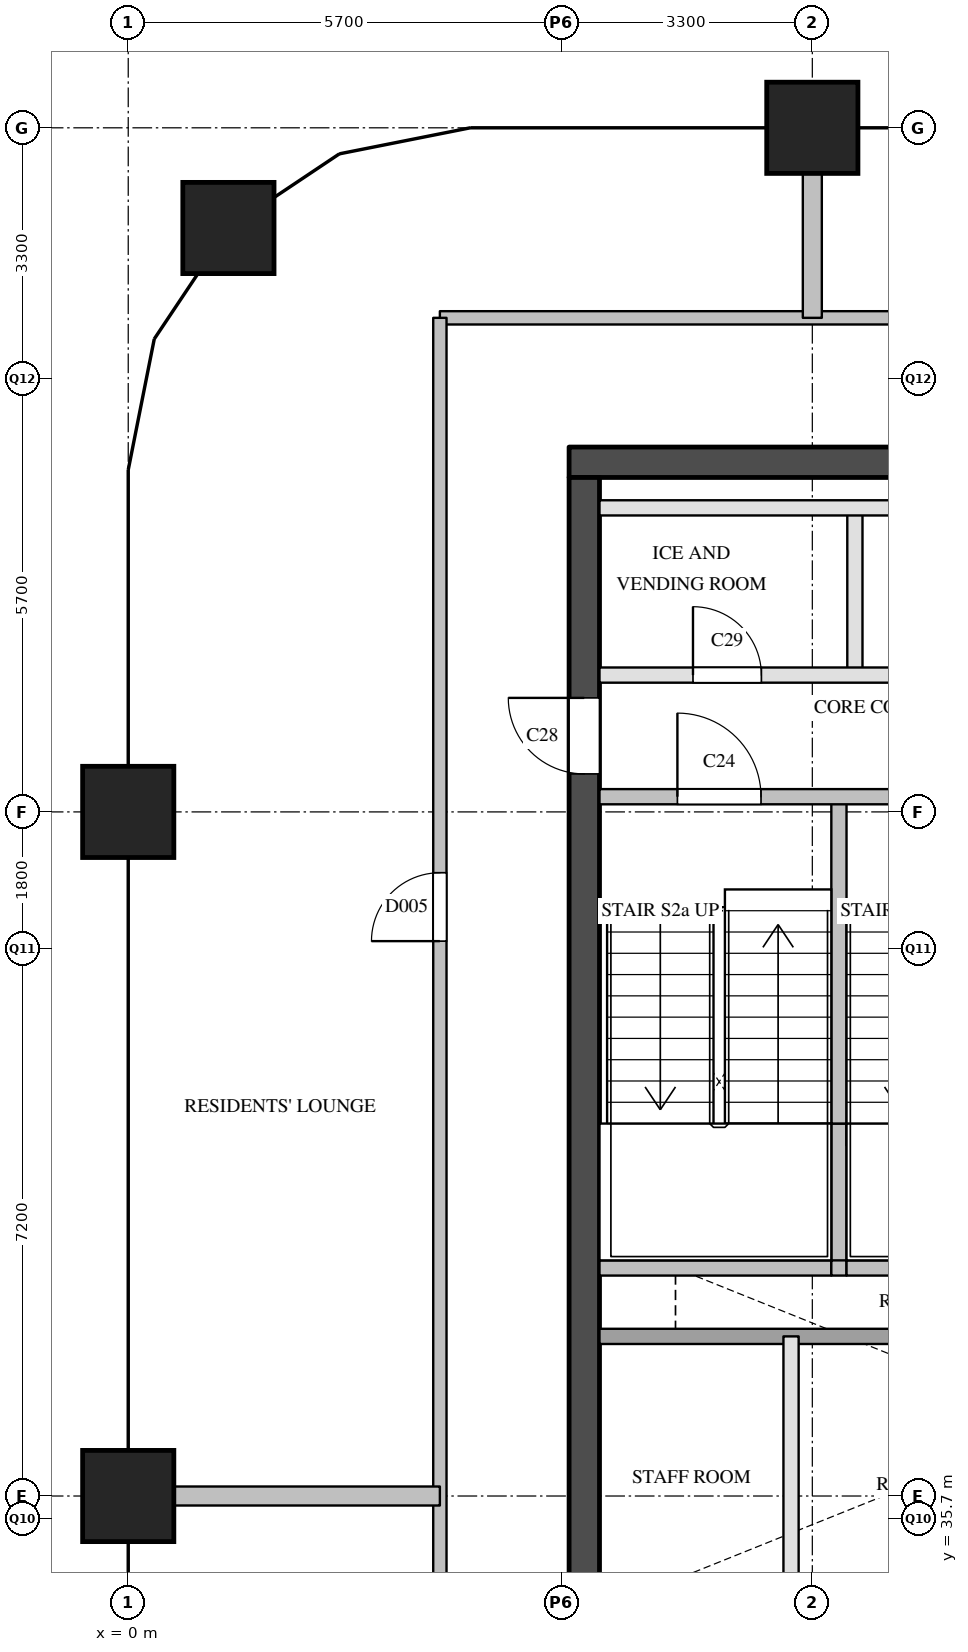
"""IFC4 building model, lengths in metres.
Left out: names, types, materials, properties, quantities, classifications, styles, units other than length and angle.
Written with IfcOpenShell. Run it as: python <this file> out.ifc"""

import sys

from ifc_helpers import new_model, si_unit, direction, frame, frame_2d, origin, origin_2d, place, context, subcontext, project, spatial, rectangle, extrude, element, fill, save


model = new_model("IFC4")
c1 = context("Model", 3, precision=1e-05, world=origin(), true_north=direction((0.0, 1.0)))
c2 = subcontext(c1, "Body", "Model", "MODEL_VIEW")
j1 = project(units=[si_unit("LENGTHUNIT", "METRE"), si_unit("PLANEANGLEUNIT", "RADIAN")], contexts=[c1])
p1 = place(None, origin())
s1 = spatial("IfcSite", under=j1, at=p1, CompositionType="ELEMENT")
p2 = place(p1, origin())
s2 = spatial("IfcBuilding", under=s1, at=p2, CompositionType="ELEMENT")
p3 = place(p2, frame((0.0, 0.0, 215.0)))
s3 = spatial("IfcBuildingStorey", under=s2, at=p3, CompositionType="ELEMENT", Elevation=215.0)
for number, where, z_axis, x_axis in (
    (1, (0.0, 36.0, 0.0), (0.0, 0.0, 1.0), (1.0, 0.0, 0.0)),
    (2, (0.0, 45.0, 0.0), (0.0, 0.0, 1.0), (1.0, 0.0, 0.0)),
    (3, (1.318, 52.682, 0.0), (0.0, 0.0, 1.0), (1.0, 0.0, 0.0)),
    (4, (9.0, 54.0, 0.0), (0.0, 0.0, 1.0), (1.0, 0.0, 0.0)),
):
    element("IfcColumn", number, at=place(p3, frame(where, z_axis=z_axis, x_axis=x_axis)), inside=s3, PredefinedType="COLUMN", context=c2, shape_type="SweptSolid", body=[
        extrude(rectangle(XDim=1.2, YDim=1.2, at=origin_2d()), origin(), (0.0, 0.0, 1.0), 3.9),
    ])
p4 = place(p3, frame((5.8, 49.6, 0.0), z_axis=(0.0, 0.0, 1.0), x_axis=(1.0, 0.0, 0.0)))
e5 = element("IfcWall", 5, at=p4, inside=s3, PredefinedType="SHEAR", context=c2, shape_type="SweptSolid", body=[
    extrude(rectangle(XDim=12.0, YDim=0.4, at=frame_2d((6.0, 0.0))), origin(), (0.0, 0.0, 1.0), 3.6),
])
p5 = place(p3, frame((6.0, 29.1, 0.0), z_axis=(0.0, 0.0, 1.0), x_axis=(0.0, 1.0, 0.0)))
e6 = element("IfcWall", 6, at=p5, inside=s3, PredefinedType="SHEAR", context=c2, shape_type="SweptSolid", body=[
    extrude(rectangle(XDim=20.3, YDim=0.4, at=frame_2d((10.15, 0.0))), origin(), (0.0, 0.0, 1.0), 3.6),
])
p6 = place(p5, frame((3.45, 0.0, 0.0)))
e7 = element("IfcOpeningElement", 7, at=p6, cuts=e6, PredefinedType="OPENING", context=c2, shape_type="SweptSolid", body=[
    extrude(rectangle(XDim=1.0, YDim=2.1, at=frame_2d((0.5, 1.05))), frame((0.0, 0.21, 0.0), z_axis=(0.0, -1.0, 0.0), x_axis=(1.0, 0.0, 0.0)), (0.0, 0.0, 1.0), 0.42),
])
p7 = place(p5, frame((16.4, 0.0, 0.0)))
e8 = element("IfcOpeningElement", 8, at=p7, cuts=e6, PredefinedType="OPENING", context=c2, shape_type="SweptSolid", body=[
    extrude(rectangle(XDim=1.0, YDim=2.1, at=frame_2d((0.5, 1.05))), frame((0.0, 0.21, 0.0), z_axis=(0.0, -1.0, 0.0), x_axis=(1.0, 0.0, 0.0)), (0.0, 0.0, 1.0), 0.42),
])
p8 = place(p3, frame((8.72, 33.8, 0.0), z_axis=(0.0, 0.0, 1.0), x_axis=(0.0, 1.0, 0.0)))
e9 = element("IfcWall", 9, at=p8, inside=s3, PredefinedType="PARTITIONING", context=c2, shape_type="SweptSolid", body=[
    extrude(rectangle(XDim=4.3, YDim=0.2, at=frame_2d((2.15, 0.0))), origin(), (0.0, 0.0, 1.0), 3.6),
])
p9 = place(p3, frame((9.35, 39.0, 0.0), z_axis=(0.0, 0.0, 1.0), x_axis=(0.0, 1.0, 0.0)))
e10 = element("IfcWall", 10, at=p9, inside=s3, PredefinedType="SOLIDWALL", context=c2, shape_type="SweptSolid", body=[
    extrude(rectangle(XDim=1.9, YDim=0.2, at=frame_2d((0.95, 0.0))), origin(), (0.0, 0.0, 1.0), 3.6),
])
p10 = place(p3, frame((9.35, 40.9, 0.0), z_axis=(0.0, 0.0, 1.0), x_axis=(0.0, 1.0, 0.0)))
e11 = element("IfcWall", 11, at=p10, inside=s3, PredefinedType="SOLIDWALL", context=c2, shape_type="SweptSolid", body=[
    extrude(rectangle(XDim=4.3, YDim=0.2, at=frame_2d((2.15, 0.0))), origin(), (0.0, 0.0, 1.0), 3.6),
])
p11 = place(p3, frame((9.56, 46.8, 0.0), z_axis=(0.0, 0.0, 1.0), x_axis=(0.0, 1.0, 0.0)))
e12 = element("IfcWall", 12, at=p11, inside=s3, PredefinedType="PARTITIONING", context=c2, shape_type="SweptSolid", body=[
    extrude(rectangle(XDim=2.2, YDim=0.2, at=frame_2d((1.1, 0.0))), origin(), (0.0, 0.0, 1.0), 3.6),
])
p12 = place(p3, frame((6.2, 38.1, 0.0), z_axis=(0.0, 0.0, 1.0), x_axis=(1.0, 0.0, 0.0)))
e13 = element("IfcWall", 13, at=p12, inside=s3, PredefinedType="SOLIDWALL", context=c2, shape_type="SweptSolid", body=[
    extrude(rectangle(XDim=11.2, YDim=0.2, at=frame_2d((5.6, 0.0))), origin(), (0.0, 0.0, 1.0), 3.6),
])
p13 = place(p12, frame((8.85, 0.0, 0.0)))
e14 = element("IfcOpeningElement", 14, at=p13, cuts=e13, PredefinedType="OPENING", context=c2, shape_type="SweptSolid", body=[
    extrude(rectangle(XDim=1.2, YDim=2.1, at=frame_2d((0.6, 1.05))), frame((0.0, 0.11, 0.0), z_axis=(0.0, -1.0, 0.0), x_axis=(1.0, 0.0, 0.0)), (0.0, 0.0, 1.0), 0.22),
])
p14 = place(p3, frame((6.2, 39.0, 0.0), z_axis=(0.0, 0.0, 1.0), x_axis=(1.0, 0.0, 0.0)))
e15 = element("IfcWall", 15, at=p14, inside=s3, PredefinedType="SOLIDWALL", context=c2, shape_type="SweptSolid", body=[
    extrude(rectangle(XDim=3.05, YDim=0.2, at=frame_2d((1.525, 0.0))), origin(), (0.0, 0.0, 1.0), 3.6),
])
p15 = place(p3, frame((9.25, 39.0, 0.0), z_axis=(0.0, 0.0, 1.0), x_axis=(1.0, 0.0, 0.0)))
e16 = element("IfcWall", 16, at=p15, inside=s3, PredefinedType="SOLIDWALL", context=c2, shape_type="SweptSolid", body=[
    extrude(rectangle(XDim=0.2, YDim=0.2, at=frame_2d((0.1, 0.0))), origin(), (0.0, 0.0, 1.0), 3.6),
])
p16 = place(p3, frame((9.45, 39.0, 0.0), z_axis=(0.0, 0.0, 1.0), x_axis=(1.0, 0.0, 0.0)))
e17 = element("IfcWall", 17, at=p16, inside=s3, PredefinedType="SOLIDWALL", context=c2, shape_type="SweptSolid", body=[
    extrude(rectangle(XDim=3.05, YDim=0.2, at=frame_2d((1.525, 0.0))), origin(), (0.0, 0.0, 1.0), 3.6),
])
p17 = place(p3, frame((6.2, 45.2, 0.0), z_axis=(0.0, 0.0, 1.0), x_axis=(1.0, 0.0, 0.0)))
e18 = element("IfcWall", 18, at=p17, inside=s3, PredefinedType="SOLIDWALL", context=c2, shape_type="SweptSolid", body=[
    extrude(rectangle(XDim=6.3, YDim=0.2, at=frame_2d((3.15, 0.0))), origin(), (0.0, 0.0, 1.0), 3.6),
])
p18 = place(p17, frame((1.025, 0.0, 0.0)))
e19 = element("IfcOpeningElement", 19, at=p18, cuts=e18, PredefinedType="OPENING", context=c2, shape_type="SweptSolid", body=[
    extrude(rectangle(XDim=1.1, YDim=2.1, at=frame_2d((0.55, 1.05))), frame((0.0, 0.11, 0.0), z_axis=(0.0, -1.0, 0.0), x_axis=(1.0, 0.0, 0.0)), (0.0, 0.0, 1.0), 0.22),
])
p19 = place(p17, frame((4.175, 0.0, 0.0)))
e20 = element("IfcOpeningElement", 20, at=p19, cuts=e18, PredefinedType="OPENING", context=c2, shape_type="SweptSolid", body=[
    extrude(rectangle(XDim=1.1, YDim=2.1, at=frame_2d((0.55, 1.05))), frame((0.0, 0.11, 0.0), z_axis=(0.0, -1.0, 0.0), x_axis=(1.0, 0.0, 0.0)), (0.0, 0.0, 1.0), 0.22),
])
p20 = place(p3, frame((6.2, 46.8, 0.0), z_axis=(0.0, 0.0, 1.0), x_axis=(1.0, 0.0, 0.0)))
e21 = element("IfcWall", 21, at=p20, inside=s3, PredefinedType="PARTITIONING", context=c2, shape_type="SweptSolid", body=[
    extrude(rectangle(XDim=11.2, YDim=0.2, at=frame_2d((5.6, 0.0))), origin(), (0.0, 0.0, 1.0), 3.6),
])
p21 = place(p20, frame((1.23, 0.0, 0.0)))
e22 = element("IfcOpeningElement", 22, at=p21, cuts=e21, PredefinedType="OPENING", context=c2, shape_type="SweptSolid", body=[
    extrude(rectangle(XDim=0.9, YDim=2.1, at=frame_2d((0.45, 1.05))), frame((0.0, 0.11, 0.0), z_axis=(0.0, -1.0, 0.0), x_axis=(1.0, 0.0, 0.0)), (0.0, 0.0, 1.0), 0.22),
])
p22 = place(p20, frame((6.83, 0.0, 0.0)))
e23 = element("IfcOpeningElement", 23, at=p22, cuts=e21, PredefinedType="OPENING", context=c2, shape_type="SweptSolid", body=[
    extrude(rectangle(XDim=0.9, YDim=2.1, at=frame_2d((0.45, 1.05))), frame((0.0, 0.11, 0.0), z_axis=(0.0, -1.0, 0.0), x_axis=(1.0, 0.0, 0.0)), (0.0, 0.0, 1.0), 0.22),
])
p23 = place(p3, frame((6.2, 49.0, 0.0), z_axis=(0.0, 0.0, 1.0), x_axis=(1.0, 0.0, 0.0)))
e24 = element("IfcWall", 24, at=p23, inside=s3, PredefinedType="PARTITIONING", context=c2, shape_type="SweptSolid", body=[
    extrude(rectangle(XDim=11.2, YDim=0.2, at=frame_2d((5.6, 0.0))), origin(), (0.0, 0.0, 1.0), 3.6),
])
p24 = place(p3, frame((4.1, 51.5, 0.0), z_axis=(0.0, 0.0, 1.0), x_axis=(1.0, 0.0, 0.0)))
e25 = element("IfcWall", 25, at=p24, inside=s3, PredefinedType="PARTITIONING", context=c2, shape_type="SweptSolid", body=[
    extrude(rectangle(XDim=15.4, YDim=0.175, at=frame_2d((7.7, 0.0))), origin(), (0.0, 0.0, 1.0), 3.6),
])
p25 = place(p24, frame((8.455, 0.0, 0.0)))
e26 = element("IfcOpeningElement", 26, at=p25, cuts=e25, PredefinedType="OPENING", context=c2, shape_type="SweptSolid", body=[
    extrude(rectangle(XDim=1.0, YDim=2.1, at=frame_2d((0.5, 1.05))), frame((0.0, 0.097, 0.0), z_axis=(0.0, -1.0, 0.0), x_axis=(1.0, 0.0, 0.0)), (0.0, 0.0, 1.0), 0.195),
])
p26 = place(p3, frame((4.1, 28.5, 0.0), z_axis=(0.0, 0.0, 1.0), x_axis=(0.0, 1.0, 0.0)))
e27 = element("IfcWall", 27, at=p26, inside=s3, PredefinedType="PARTITIONING", context=c2, shape_type="SweptSolid", body=[
    extrude(rectangle(XDim=23.0, YDim=0.175, at=frame_2d((11.5, 0.0))), origin(), (0.0, 0.0, 1.0), 3.6),
])
p27 = place(p26, frame((3.3, 0.0, 0.0)))
e28 = element("IfcOpeningElement", 28, at=p27, cuts=e27, PredefinedType="OPENING", context=c2, shape_type="SweptSolid", body=[
    extrude(rectangle(XDim=0.9, YDim=2.1, at=frame_2d((0.45, 1.05))), frame((0.0, 0.097, 0.0), z_axis=(0.0, -1.0, 0.0), x_axis=(1.0, 0.0, 0.0)), (0.0, 0.0, 1.0), 0.195),
])
p28 = place(p26, frame((14.8, 0.0, 0.0)))
e29 = element("IfcOpeningElement", 29, at=p28, cuts=e27, PredefinedType="OPENING", context=c2, shape_type="SweptSolid", body=[
    extrude(rectangle(XDim=0.9, YDim=2.1, at=frame_2d((0.45, 1.05))), frame((0.0, 0.097, 0.0), z_axis=(0.0, -1.0, 0.0), x_axis=(1.0, 0.0, 0.0)), (0.0, 0.0, 1.0), 0.195),
])
p29 = place(p3, frame((0.0, 36.0, 0.0), z_axis=(0.0, 0.0, 1.0), x_axis=(1.0, 0.0, 0.0)))
e30 = element("IfcWall", 30, at=p29, inside=s3, PredefinedType="PARTITIONING", context=c2, shape_type="SweptSolid", body=[
    extrude(rectangle(XDim=4.1, YDim=0.25, at=frame_2d((2.05, 0.0))), origin(), (0.0, 0.0, 1.0), 3.6),
])
p30 = place(p3, frame((9.0, 51.5, 0.0), z_axis=(0.0, 0.0, 1.0), x_axis=(0.0, 1.0, 0.0)))
e31 = element("IfcWall", 31, at=p30, inside=s3, PredefinedType="PARTITIONING", context=c2, shape_type="SweptSolid", body=[
    extrude(rectangle(XDim=2.5, YDim=0.25, at=frame_2d((1.25, 0.0))), origin(), (0.0, 0.0, 1.0), 3.6),
])
p31 = place(p18, origin())
e32 = element("IfcDoor", 32, at=p31, inside=s3, OperationType="SINGLE_SWING_LEFT", PredefinedType="DOOR", context=c2, shape_type="SweptSolid", body=[
    extrude(rectangle(XDim=1.1, YDim=2.1, at=frame_2d((0.55, 1.05))), frame((0.0, 0.025, 0.0), z_axis=(0.0, -1.0, 0.0), x_axis=(1.0, 0.0, 0.0)), (0.0, 0.0, 1.0), 0.05),
])
fill(e19, e32)
p32 = place(p7, origin())
e33 = element("IfcDoor", 33, at=p32, inside=s3, OperationType="SINGLE_SWING_RIGHT", PredefinedType="DOOR", context=c2, shape_type="SweptSolid", body=[
    extrude(rectangle(XDim=1.0, YDim=2.1, at=frame_2d((0.5, 1.05))), frame((0.0, 0.025, 0.0), z_axis=(0.0, -1.0, 0.0), x_axis=(1.0, 0.0, 0.0)), (0.0, 0.0, 1.0), 0.05),
])
fill(e8, e33)
p33 = place(p21, origin())
e34 = element("IfcDoor", 34, at=p33, inside=s3, OperationType="SINGLE_SWING_LEFT", PredefinedType="DOOR", context=c2, shape_type="SweptSolid", body=[
    extrude(rectangle(XDim=0.9, YDim=2.1, at=frame_2d((0.45, 1.05))), frame((0.0, 0.025, 0.0), z_axis=(0.0, -1.0, 0.0), x_axis=(1.0, 0.0, 0.0)), (0.0, 0.0, 1.0), 0.05),
])
fill(e22, e34)
p34 = place(p28, origin())
e35 = element("IfcDoor", 35, at=p34, inside=s3, OperationType="SINGLE_SWING_LEFT", PredefinedType="DOOR", context=c2, shape_type="SweptSolid", body=[
    extrude(rectangle(XDim=0.9, YDim=2.1, at=frame_2d((0.45, 1.05))), frame((0.0, 0.025, 0.0), z_axis=(0.0, -1.0, 0.0), x_axis=(1.0, 0.0, 0.0)), (0.0, 0.0, 1.0), 0.05),
])
fill(e29, e35)
save(model, sys.argv[1])
